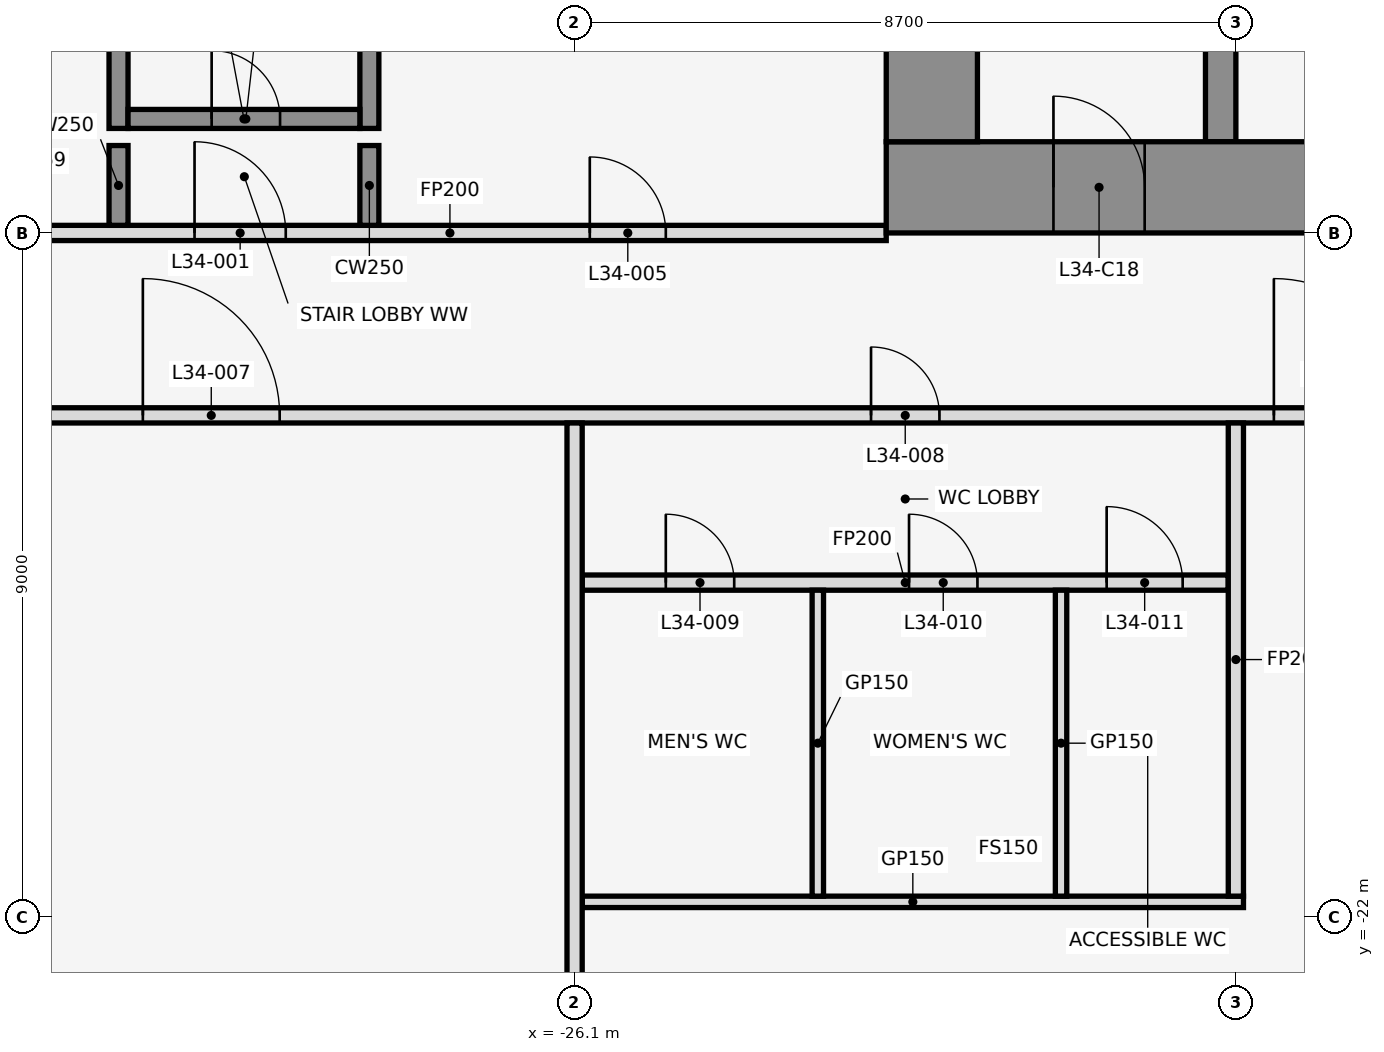
"""IFC4 building model, lengths in metres.
Left out: names, types, materials, properties, quantities, classifications, styles, units other than length and angle.
Written with IfcOpenShell. Run it as: python <this file> out.ifc"""

import sys

from ifc_helpers import new_model, si_unit, direction, frame, frame_2d, origin, place, context, subcontext, project, spatial, rectangle, extrude, element, fill, save


model = new_model("IFC4")
c1 = context("Model", 3, precision=1e-05, world=origin(), true_north=direction((0.0, 1.0)))
c2 = subcontext(c1, "Body", "Model", "MODEL_VIEW")
j1 = project(units=[si_unit("LENGTHUNIT", "METRE"), si_unit("PLANEANGLEUNIT", "RADIAN")], contexts=[c1])
p1 = place(None, origin())
s1 = spatial("IfcSite", under=j1, at=p1, CompositionType="ELEMENT")
p2 = place(p1, origin())
s2 = spatial("IfcBuilding", under=s1, at=p2, CompositionType="ELEMENT")
p3 = place(p2, frame((0.0, 0.0, 156.8)))
s3 = spatial("IfcBuildingStorey", under=s2, at=p3, CompositionType="ELEMENT", Elevation=156.8)
p4 = place(p3, frame((-32.1, -11.625, 0.0), z_axis=(0.0, 0.0, 1.0), x_axis=(0.0, 1.0, 0.0)))
e1 = element("IfcWall", 1, at=p4, inside=s3, PredefinedType="SHEAR", context=c2, shape_type="SweptSolid", body=[
    extrude(rectangle(XDim=7.325, YDim=0.25, at=frame_2d((3.663, 0.0))), origin(), (0.0, 0.0, 1.0), 4.1),
])
p5 = place(p3, frame((-28.8, -11.625, 0.0), z_axis=(0.0, 0.0, 1.0), x_axis=(0.0, 1.0, 0.0)))
e2 = element("IfcWall", 2, at=p5, inside=s3, PredefinedType="SHEAR", context=c2, shape_type="SweptSolid", body=[
    extrude(rectangle(XDim=7.25, YDim=0.25, at=frame_2d((3.625, 0.0))), origin(), (0.0, 0.0, 1.0), 4.1),
])
p6 = place(p3, frame((-31.975, -11.5, 0.0), z_axis=(0.0, 0.0, 1.0), x_axis=(1.0, 0.0, 0.0)))
e3 = element("IfcWall", 3, at=p6, inside=s3, PredefinedType="SHEAR", context=c2, shape_type="SweptSolid", body=[
    extrude(rectangle(XDim=3.05, YDim=0.25, at=frame_2d((1.525, 0.0))), origin(), (0.0, 0.0, 1.0), 4.1),
])
p7 = place(p6, frame((1.1, 0.0, 0.0)))
e4 = element("IfcOpeningElement", 4, at=p7, cuts=e3, PredefinedType="OPENING", context=c2, shape_type="SweptSolid", body=[
    extrude(rectangle(XDim=0.9, YDim=2.1, at=frame_2d((0.45, 1.05))), frame((0.0, 0.137, 0.0), z_axis=(0.0, -1.0, 0.0), x_axis=(1.0, 0.0, 0.0)), (0.0, 0.0, 1.0), 0.274),
])
p8 = place(p3, frame((-26.0, -21.8, 0.0), z_axis=(0.0, 0.0, 1.0), x_axis=(1.0, 0.0, 0.0)))
e5 = element("IfcWall", 5, at=p8, inside=s3, PredefinedType="PARTITIONING", context=c2, shape_type="SweptSolid", body=[
    extrude(rectangle(XDim=8.7, YDim=0.15, at=frame_2d((4.35, 0.0))), origin(), (0.0, 0.0, 1.0), 2.84),
])
p9 = place(p3, frame((-26.0, -17.6, 0.0), z_axis=(0.0, 0.0, 1.0), x_axis=(1.0, 0.0, 0.0)))
e6 = element("IfcWall", 6, at=p9, inside=s3, PredefinedType="PARTITIONING", context=c2, shape_type="SweptSolid", body=[
    extrude(rectangle(XDim=8.5, YDim=0.2, at=frame_2d((4.25, 0.0))), origin(), (0.0, 0.0, 1.0), 2.84),
])
p10 = place(p9, frame((1.1, 0.0, 0.0)))
e7 = element("IfcOpeningElement", 7, at=p10, cuts=e6, PredefinedType="OPENING", context=c2, shape_type="SweptSolid", body=[
    extrude(rectangle(XDim=0.9, YDim=2.1, at=frame_2d((0.45, 1.05))), frame((0.0, 0.112, 0.0), z_axis=(0.0, -1.0, 0.0), x_axis=(1.0, 0.0, 0.0)), (0.0, 0.0, 1.0), 0.224),
])
p11 = place(p9, frame((4.3, 0.0, 0.0)))
e8 = element("IfcOpeningElement", 8, at=p11, cuts=e6, PredefinedType="OPENING", context=c2, shape_type="SweptSolid", body=[
    extrude(rectangle(XDim=0.9, YDim=2.1, at=frame_2d((0.45, 1.05))), frame((0.0, 0.112, 0.0), z_axis=(0.0, -1.0, 0.0), x_axis=(1.0, 0.0, 0.0)), (0.0, 0.0, 1.0), 0.224),
])
p12 = place(p9, frame((6.9, 0.0, 0.0)))
e9 = element("IfcOpeningElement", 9, at=p12, cuts=e6, PredefinedType="OPENING", context=c2, shape_type="SweptSolid", body=[
    extrude(rectangle(XDim=1.0, YDim=2.1, at=frame_2d((0.5, 1.05))), frame((0.0, 0.112, 0.0), z_axis=(0.0, -1.0, 0.0), x_axis=(1.0, 0.0, 0.0)), (0.0, 0.0, 1.0), 0.224),
])
p13 = place(p3, frame((-35.68, -15.4, 0.0), z_axis=(0.0, 0.0, 1.0), x_axis=(1.0, 0.0, 0.0)))
e10 = element("IfcWall", 10, at=p13, inside=s3, PredefinedType="PARTITIONING", context=c2, shape_type="SweptSolid", body=[
    extrude(rectangle(XDim=71.36, YDim=0.2, at=frame_2d((35.68, 0.0))), origin(), (0.0, 0.0, 1.0), 2.84),
])
p14 = place(p13, frame((3.9, 0.0, 0.0)))
e11 = element("IfcOpeningElement", 11, at=p14, cuts=e10, PredefinedType="OPENING", context=c2, shape_type="SweptSolid", body=[
    extrude(rectangle(XDim=1.8, YDim=2.1, at=frame_2d((0.9, 1.05))), frame((0.0, 0.112, 0.0), z_axis=(0.0, -1.0, 0.0), x_axis=(1.0, 0.0, 0.0)), (0.0, 0.0, 1.0), 0.224),
])
p15 = place(p13, frame((13.48, 0.0, 0.0)))
e12 = element("IfcOpeningElement", 12, at=p15, cuts=e10, PredefinedType="OPENING", context=c2, shape_type="SweptSolid", body=[
    extrude(rectangle(XDim=0.9, YDim=2.1, at=frame_2d((0.45, 1.05))), frame((0.0, 0.112, 0.0), z_axis=(0.0, -1.0, 0.0), x_axis=(1.0, 0.0, 0.0)), (0.0, 0.0, 1.0), 0.224),
])
p16 = place(p13, frame((18.78, 0.0, 0.0)))
e13 = element("IfcOpeningElement", 13, at=p16, cuts=e10, PredefinedType="OPENING", context=c2, shape_type="SweptSolid", body=[
    extrude(rectangle(XDim=1.8, YDim=2.1, at=frame_2d((0.9, 1.05))), frame((0.0, 0.112, 0.0), z_axis=(0.0, -1.0, 0.0), x_axis=(1.0, 0.0, 0.0)), (0.0, 0.0, 1.0), 0.224),
])
p17 = place(p13, frame((24.58, 0.0, 0.0)))
e14 = element("IfcOpeningElement", 14, at=p17, cuts=e10, PredefinedType="OPENING", context=c2, shape_type="SweptSolid", body=[
    extrude(rectangle(XDim=1.8, YDim=2.1, at=frame_2d((0.9, 1.05))), frame((0.0, 0.112, 0.0), z_axis=(0.0, -1.0, 0.0), x_axis=(1.0, 0.0, 0.0)), (0.0, 0.0, 1.0), 0.224),
])
p18 = place(p13, frame((34.78, 0.0, 0.0)))
e15 = element("IfcOpeningElement", 15, at=p18, cuts=e10, PredefinedType="OPENING", context=c2, shape_type="SweptSolid", body=[
    extrude(rectangle(XDim=1.8, YDim=2.1, at=frame_2d((0.9, 1.05))), frame((0.0, 0.112, 0.0), z_axis=(0.0, -1.0, 0.0), x_axis=(1.0, 0.0, 0.0)), (0.0, 0.0, 1.0), 0.224),
])
p19 = place(p13, frame((43.48, 0.0, 0.0)))
e16 = element("IfcOpeningElement", 16, at=p19, cuts=e10, PredefinedType="OPENING", context=c2, shape_type="SweptSolid", body=[
    extrude(rectangle(XDim=1.8, YDim=2.1, at=frame_2d((0.9, 1.05))), frame((0.0, 0.112, 0.0), z_axis=(0.0, -1.0, 0.0), x_axis=(1.0, 0.0, 0.0)), (0.0, 0.0, 1.0), 0.224),
])
p20 = place(p13, frame((52.18, 0.0, 0.0)))
e17 = element("IfcOpeningElement", 17, at=p20, cuts=e10, PredefinedType="OPENING", context=c2, shape_type="SweptSolid", body=[
    extrude(rectangle(XDim=1.8, YDim=2.1, at=frame_2d((0.9, 1.05))), frame((0.0, 0.112, 0.0), z_axis=(0.0, -1.0, 0.0), x_axis=(1.0, 0.0, 0.0)), (0.0, 0.0, 1.0), 0.224),
])
p21 = place(p13, frame((64.18, 0.0, 0.0)))
e18 = element("IfcOpeningElement", 18, at=p21, cuts=e10, PredefinedType="OPENING", context=c2, shape_type="SweptSolid", body=[
    extrude(rectangle(XDim=1.8, YDim=2.1, at=frame_2d((0.9, 1.05))), frame((0.0, 0.112, 0.0), z_axis=(0.0, -1.0, 0.0), x_axis=(1.0, 0.0, 0.0)), (0.0, 0.0, 1.0), 0.224),
])
p22 = place(p3, frame((-33.48, -13.0, 0.0), z_axis=(0.0, 0.0, 1.0), x_axis=(1.0, 0.0, 0.0)))
e19 = element("IfcWall", 19, at=p22, inside=s3, PredefinedType="PARTITIONING", context=c2, shape_type="SweptSolid", body=[
    extrude(rectangle(XDim=11.48, YDim=0.2, at=frame_2d((5.74, 0.0))), origin(), (0.0, 0.0, 1.0), 2.84),
])
p23 = place(p22, frame((2.38, 0.0, 0.0)))
e20 = element("IfcOpeningElement", 20, at=p23, cuts=e19, PredefinedType="OPENING", context=c2, shape_type="SweptSolid", body=[
    extrude(rectangle(XDim=1.2, YDim=2.1, at=frame_2d((0.6, 1.05))), frame((0.0, 0.112, 0.0), z_axis=(0.0, -1.0, 0.0), x_axis=(1.0, 0.0, 0.0)), (0.0, 0.0, 1.0), 0.224),
])
p24 = place(p22, frame((7.58, 0.0, 0.0)))
e21 = element("IfcOpeningElement", 21, at=p24, cuts=e19, PredefinedType="OPENING", context=c2, shape_type="SweptSolid", body=[
    extrude(rectangle(XDim=1.0, YDim=2.1, at=frame_2d((0.5, 1.05))), frame((0.0, 0.112, 0.0), z_axis=(0.0, -1.0, 0.0), x_axis=(1.0, 0.0, 0.0)), (0.0, 0.0, 1.0), 0.224),
])
for number, where, z_axis, x_axis in (
    (22, (-32.1, -12.9, 0.0), (0.0, 0.0, 1.0), (0.0, 1.0, 0.0)),
    (23, (-28.8, -12.9, 0.0), (0.0, 0.0, 1.0), (0.0, 1.0, 0.0)),
):
    element("IfcWall", number, at=place(p3, frame(where, z_axis=z_axis, x_axis=x_axis)), inside=s3, PredefinedType="SHEAR", context=c2, shape_type="SweptSolid", body=[
        extrude(rectangle(XDim=1.05, YDim=0.25, at=frame_2d((0.525, 0.0))), origin(), (0.0, 0.0, 1.0), 4.1),
    ])
p25 = place(p3, frame((-26.1, -34.96, 0.0), z_axis=(0.0, 0.0, 1.0), x_axis=(0.0, 1.0, 0.0)))
e24 = element("IfcWall", 24, at=p25, inside=s3, PredefinedType="PARTITIONING", context=c2, shape_type="SweptSolid", body=[
    extrude(rectangle(XDim=19.46, YDim=0.2, at=frame_2d((9.73, 0.0))), origin(), (0.0, 0.0, 1.0), 2.84),
])
for number, where, z_axis, x_axis in (
    (25, (-22.9, -21.725, 0.0), (0.0, 0.0, 1.0), (0.0, 1.0, 0.0)),
    (26, (-19.7, -21.725, 0.0), (0.0, 0.0, 1.0), (0.0, 1.0, 0.0)),
):
    element("IfcWall", number, at=place(p3, frame(where, z_axis=z_axis, x_axis=x_axis)), inside=s3, PredefinedType="PARTITIONING", context=c2, shape_type="SweptSolid", body=[
        extrude(rectangle(XDim=4.025, YDim=0.15, at=frame_2d((2.013, 0.0))), origin(), (0.0, 0.0, 1.0), 2.84),
    ])
p26 = place(p3, frame((-17.4, -21.725, 0.0), z_axis=(0.0, 0.0, 1.0), x_axis=(0.0, 1.0, 0.0)))
e27 = element("IfcWall", 27, at=p26, inside=s3, PredefinedType="PARTITIONING", context=c2, shape_type="SweptSolid", body=[
    extrude(rectangle(XDim=6.225, YDim=0.2, at=frame_2d((3.113, 0.0))), origin(), (0.0, 0.0, 1.0), 2.84),
])
p27 = place(p3, frame((-17.6, -11.8, 0.0), z_axis=(0.0, 0.0, 1.0), x_axis=(0.0, 1.0, 0.0)))
e28 = element("IfcWall", 28, at=p27, inside=s3, PredefinedType="SHEAR", context=c2, shape_type="SweptSolid", body=[
    extrude(rectangle(XDim=10.6, YDim=0.4, at=frame_2d((5.3, 0.0))), origin(), (0.0, 0.0, 1.0), 4.1),
])
p28 = place(p27, frame((1.25, 0.0, 0.0)))
e29 = element("IfcOpeningElement", 29, at=p28, cuts=e28, PredefinedType="OPENING", context=c2, shape_type="SweptSolid", body=[
    extrude(rectangle(XDim=1.1, YDim=2.1, at=frame_2d((0.55, 1.05))), frame((0.0, 0.212, 0.0), z_axis=(0.0, -1.0, 0.0), x_axis=(1.0, 0.0, 0.0)), (0.0, 0.0, 1.0), 0.424),
])
p29 = place(p27, frame((3.95, 0.0, 0.0)))
e30 = element("IfcOpeningElement", 30, at=p29, cuts=e28, PredefinedType="OPENING", context=c2, shape_type="SweptSolid", body=[
    extrude(rectangle(XDim=1.1, YDim=2.1, at=frame_2d((0.55, 1.05))), frame((0.0, 0.212, 0.0), z_axis=(0.0, -1.0, 0.0), x_axis=(1.0, 0.0, 0.0)), (0.0, 0.0, 1.0), 0.424),
])
p30 = place(p3, frame((-22.0, -12.4, 0.0), z_axis=(0.0, 0.0, 1.0), x_axis=(1.0, 0.0, 0.0)))
e31 = element("IfcWall", 31, at=p30, inside=s3, PredefinedType="SHEAR", context=c2, shape_type="SweptSolid", body=[
    extrude(rectangle(XDim=44.0, YDim=1.2, at=frame_2d((22.0, 0.0))), origin(), (0.0, 0.0, 1.0), 4.1),
])
p31 = place(p30, frame((2.2, 0.0, 0.0)))
e32 = element("IfcOpeningElement", 32, at=p31, cuts=e31, PredefinedType="OPENING", context=c2, shape_type="SweptSolid", body=[
    extrude(rectangle(XDim=1.2, YDim=2.1, at=frame_2d((0.6, 1.05))), frame((0.0, 0.612, 0.0), z_axis=(0.0, -1.0, 0.0), x_axis=(1.0, 0.0, 0.0)), (0.0, 0.0, 1.0), 1.224),
])
p32 = place(p30, frame((21.4, 0.0, 0.0)))
e33 = element("IfcOpeningElement", 33, at=p32, cuts=e31, PredefinedType="OPENING", context=c2, shape_type="SweptSolid", body=[
    extrude(rectangle(XDim=1.2, YDim=2.1, at=frame_2d((0.6, 1.05))), frame((0.0, 0.612, 0.0), z_axis=(0.0, -1.0, 0.0), x_axis=(1.0, 0.0, 0.0)), (0.0, 0.0, 1.0), 1.224),
])
p33 = place(p30, frame((40.6, 0.0, 0.0)))
e34 = element("IfcOpeningElement", 34, at=p33, cuts=e31, PredefinedType="OPENING", context=c2, shape_type="SweptSolid", body=[
    extrude(rectangle(XDim=1.2, YDim=2.1, at=frame_2d((0.6, 1.05))), frame((0.0, 0.612, 0.0), z_axis=(0.0, -1.0, 0.0), x_axis=(1.0, 0.0, 0.0)), (0.0, 0.0, 1.0), 1.224),
])
p34 = place(p30, frame((16.0, 0.0, 0.0)))
e35 = element("IfcOpeningElement", 35, at=p34, cuts=e31, PredefinedType="OPENING", context=c2, shape_type="SweptSolid", body=[
    extrude(rectangle(XDim=1.8, YDim=2.1, at=frame_2d((0.9, 1.05))), frame((0.0, 0.612, 0.0), z_axis=(0.0, -1.0, 0.0), x_axis=(1.0, 0.0, 0.0)), (0.0, 0.0, 1.0), 1.224),
])
p35 = place(p30, frame((6.3, 0.0, 0.0)))
e36 = element("IfcOpeningElement", 36, at=p35, cuts=e31, PredefinedType="OPENING", context=c2, shape_type="SweptSolid", body=[
    extrude(rectangle(XDim=1.2, YDim=2.1, at=frame_2d((0.6, 1.05))), frame((0.0, 0.612, 0.0), z_axis=(0.0, -1.0, 0.0), x_axis=(1.0, 0.0, 0.0)), (0.0, 0.0, 1.0), 1.224),
])
p36 = place(p30, frame((26.2, 0.0, 0.0)))
e37 = element("IfcOpeningElement", 37, at=p36, cuts=e31, PredefinedType="OPENING", context=c2, shape_type="SweptSolid", body=[
    extrude(rectangle(XDim=1.8, YDim=2.1, at=frame_2d((0.9, 1.05))), frame((0.0, 0.612, 0.0), z_axis=(0.0, -1.0, 0.0), x_axis=(1.0, 0.0, 0.0)), (0.0, 0.0, 1.0), 1.224),
])
p37 = place(p30, frame((36.5, 0.0, 0.0)))
e38 = element("IfcOpeningElement", 38, at=p37, cuts=e31, PredefinedType="OPENING", context=c2, shape_type="SweptSolid", body=[
    extrude(rectangle(XDim=1.2, YDim=2.1, at=frame_2d((0.6, 1.05))), frame((0.0, 0.612, 0.0), z_axis=(0.0, -1.0, 0.0), x_axis=(1.0, 0.0, 0.0)), (0.0, 0.0, 1.0), 1.224),
])
p38 = place(p3, frame((-21.4, -11.8, 0.0), z_axis=(0.0, 0.0, 1.0), x_axis=(0.0, 1.0, 0.0)))
e39 = element("IfcWall", 39, at=p38, inside=s3, PredefinedType="SHEAR", context=c2, shape_type="SweptSolid", body=[
    extrude(rectangle(XDim=10.6, YDim=1.2, at=frame_2d((5.3, 0.0))), origin(), (0.0, 0.0, 1.0), 4.1),
])
p39 = place(p23, origin())
e40 = element("IfcDoor", 40, at=p39, inside=s3, OperationType="SINGLE_SWING_LEFT", PredefinedType="DOOR", context=c2, shape_type="SweptSolid", body=[
    extrude(rectangle(XDim=1.2, YDim=2.1, at=frame_2d((0.6, 1.05))), frame((0.0, 0.025, 0.0), z_axis=(0.0, -1.0, 0.0), x_axis=(1.0, 0.0, 0.0)), (0.0, 0.0, 1.0), 0.05),
])
fill(e20, e40)
p40 = place(p7, origin())
e41 = element("IfcDoor", 41, at=p40, inside=s3, OperationType="SINGLE_SWING_LEFT", PredefinedType="DOOR", context=c2, shape_type="SweptSolid", body=[
    extrude(rectangle(XDim=0.9, YDim=2.1, at=frame_2d((0.45, 1.05))), frame((0.0, 0.025, 0.0), z_axis=(0.0, -1.0, 0.0), x_axis=(1.0, 0.0, 0.0)), (0.0, 0.0, 1.0), 0.05),
])
fill(e4, e41)
p41 = place(p24, origin())
e42 = element("IfcDoor", 42, at=p41, inside=s3, OperationType="SINGLE_SWING_LEFT", PredefinedType="DOOR", context=c2, shape_type="SweptSolid", body=[
    extrude(rectangle(XDim=1.0, YDim=2.1, at=frame_2d((0.5, 1.05))), frame((0.0, 0.025, 0.0), z_axis=(0.0, -1.0, 0.0), x_axis=(1.0, 0.0, 0.0)), (0.0, 0.0, 1.0), 0.05),
])
fill(e21, e42)
p42 = place(p14, origin())
e43 = element("IfcDoor", 43, at=p42, inside=s3, OperationType="SINGLE_SWING_LEFT", PredefinedType="DOOR", context=c2, shape_type="SweptSolid", body=[
    extrude(rectangle(XDim=1.8, YDim=2.1, at=frame_2d((0.9, 1.05))), frame((0.0, 0.025, 0.0), z_axis=(0.0, -1.0, 0.0), x_axis=(1.0, 0.0, 0.0)), (0.0, 0.0, 1.0), 0.05),
])
fill(e11, e43)
p43 = place(p15, frame((0.9, 0.0, 0.0), z_axis=(0.0, 0.0, 1.0), x_axis=(-1.0, 0.0, 0.0)))
e44 = element("IfcDoor", 44, at=p43, inside=s3, OperationType="SINGLE_SWING_RIGHT", PredefinedType="DOOR", context=c2, shape_type="SweptSolid", body=[
    extrude(rectangle(XDim=0.9, YDim=2.1, at=frame_2d((0.45, 1.05))), frame((0.0, 0.025, 0.0), z_axis=(0.0, -1.0, 0.0), x_axis=(1.0, 0.0, 0.0)), (0.0, 0.0, 1.0), 0.05),
])
fill(e12, e44)
p44 = place(p10, frame((0.9, 0.0, 0.0), z_axis=(0.0, 0.0, 1.0), x_axis=(-1.0, 0.0, 0.0)))
e45 = element("IfcDoor", 45, at=p44, inside=s3, OperationType="SINGLE_SWING_RIGHT", PredefinedType="DOOR", context=c2, shape_type="SweptSolid", body=[
    extrude(rectangle(XDim=0.9, YDim=2.1, at=frame_2d((0.45, 1.05))), frame((0.0, 0.025, 0.0), z_axis=(0.0, -1.0, 0.0), x_axis=(1.0, 0.0, 0.0)), (0.0, 0.0, 1.0), 0.05),
])
fill(e7, e45)
p45 = place(p11, frame((0.9, 0.0, 0.0), z_axis=(0.0, 0.0, 1.0), x_axis=(-1.0, 0.0, 0.0)))
e46 = element("IfcDoor", 46, at=p45, inside=s3, OperationType="SINGLE_SWING_LEFT", PredefinedType="DOOR", context=c2, shape_type="SweptSolid", body=[
    extrude(rectangle(XDim=0.9, YDim=2.1, at=frame_2d((0.45, 1.05))), frame((0.0, 0.025, 0.0), z_axis=(0.0, -1.0, 0.0), x_axis=(1.0, 0.0, 0.0)), (0.0, 0.0, 1.0), 0.05),
])
fill(e8, e46)
p46 = place(p12, frame((1.0, 0.0, 0.0), z_axis=(0.0, 0.0, 1.0), x_axis=(-1.0, 0.0, 0.0)))
e47 = element("IfcDoor", 47, at=p46, inside=s3, OperationType="SINGLE_SWING_RIGHT", PredefinedType="DOOR", context=c2, shape_type="SweptSolid", body=[
    extrude(rectangle(XDim=1.0, YDim=2.1, at=frame_2d((0.5, 1.05))), frame((0.0, 0.025, 0.0), z_axis=(0.0, -1.0, 0.0), x_axis=(1.0, 0.0, 0.0)), (0.0, 0.0, 1.0), 0.05),
])
fill(e9, e47)
p47 = place(p16, origin())
e48 = element("IfcDoor", 48, at=p47, inside=s3, OperationType="SINGLE_SWING_LEFT", PredefinedType="DOOR", context=c2, shape_type="SweptSolid", body=[
    extrude(rectangle(XDim=1.8, YDim=2.1, at=frame_2d((0.9, 1.05))), frame((0.0, 0.025, 0.0), z_axis=(0.0, -1.0, 0.0), x_axis=(1.0, 0.0, 0.0)), (0.0, 0.0, 1.0), 0.05),
])
fill(e13, e48)
p48 = place(p31, frame((1.2, 0.0, 0.0), z_axis=(0.0, 0.0, 1.0), x_axis=(-1.0, 0.0, 0.0)))
e49 = element("IfcDoor", 49, at=p48, inside=s3, OperationType="SINGLE_SWING_RIGHT", PredefinedType="DOOR", context=c2, shape_type="SweptSolid", body=[
    extrude(rectangle(XDim=1.2, YDim=2.1, at=frame_2d((0.6, 1.05))), frame((0.0, 0.025, 0.0), z_axis=(0.0, -1.0, 0.0), x_axis=(1.0, 0.0, 0.0)), (0.0, 0.0, 1.0), 0.05),
])
fill(e32, e49)
save(model, sys.argv[1])
